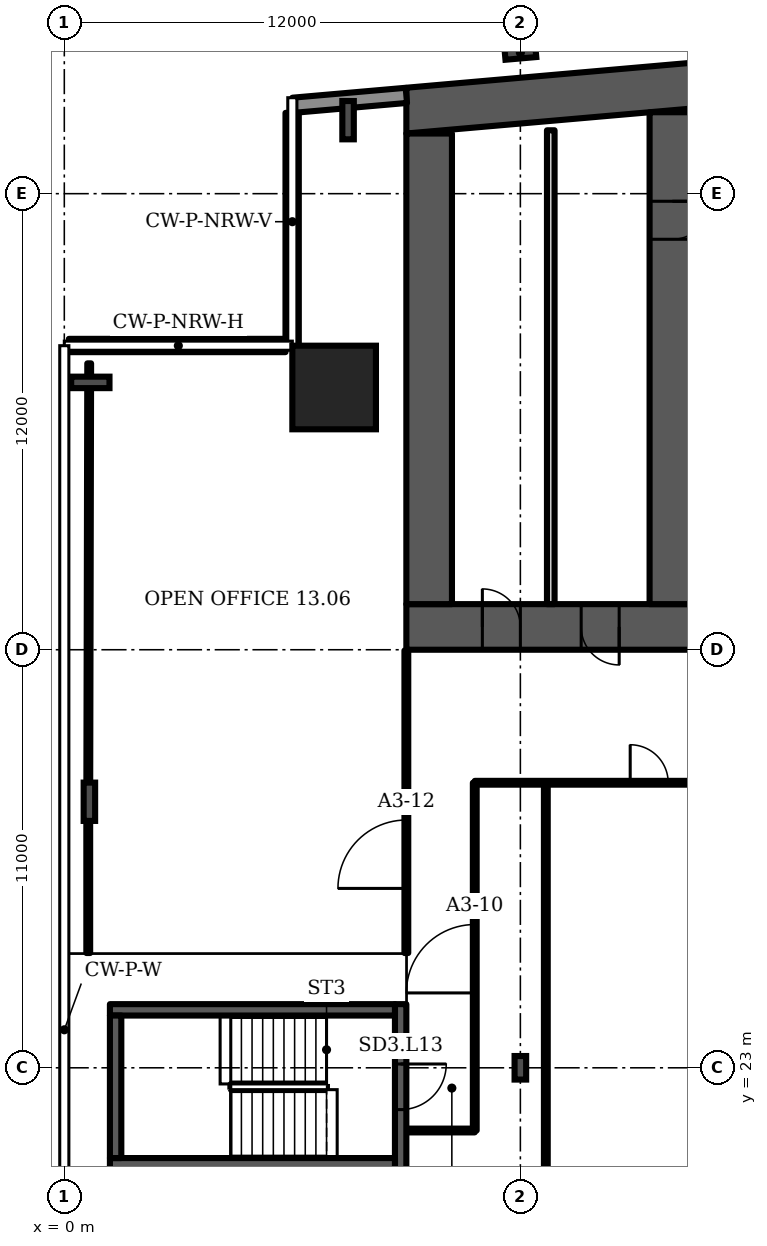
"""IFC4 building model, lengths in metres.
Left out: names, types, materials, properties, quantities, classifications, styles, units other than length and angle.
Written with IfcOpenShell. Run it as: python <this file> out.ifc"""

import sys

from ifc_helpers import new_model, si_unit, direction, frame, frame_2d, origin, origin_2d, place, context, subcontext, project, spatial, polyline, rectangle, i_section, outline, extrude, element, fill, save


model = new_model("IFC4")
c1 = context("Model", 3, precision=1e-05, world=origin(), true_north=direction((0.0, 1.0)))
c2 = subcontext(c1, "Body", "Model", "MODEL_VIEW")
j1 = project(units=[si_unit("LENGTHUNIT", "METRE"), si_unit("PLANEANGLEUNIT", "RADIAN")], contexts=[c1])
p1 = place(None, origin())
s1 = spatial("IfcSite", under=j1, at=p1, CompositionType="ELEMENT")
p2 = place(p1, origin())
s2 = spatial("IfcBuilding", under=s1, at=p2, CompositionType="ELEMENT")
p3 = place(p2, frame((0.0, 0.0, 66.7)))
s3 = spatial("IfcBuildingStorey", under=s2, at=p3, CompositionType="ELEMENT", Elevation=66.7)
p4 = place(p3, origin())
e1 = element("IfcWall", 1, at=p4, inside=s3, PredefinedType="SHEAR", context=c2, shape_type="SweptSolid", body=[
    extrude(outline(polyline([(9.0, 47.583), (37.0, 50.032), (65.0, 47.583), (65.0, 48.787), (37.0, 51.237), (9.0, 48.787), (9.0, 47.583)])), origin(), (0.0, 0.0, 1.0), 3.6),
])
p5 = place(p3, frame((9.0, 34.6, 0.0), z_axis=(0.0, 0.0, 1.0), x_axis=(1.0, 0.0, 0.0)))
e2 = element("IfcWall", 2, at=p5, inside=s3, PredefinedType="SHEAR", context=c2, shape_type="SweptSolid", body=[
    extrude(rectangle(XDim=56.0, YDim=1.2, at=frame_2d((28.0, 0.0))), origin(), (0.0, 0.0, 1.0), 3.6),
])
p6 = place(p5, frame((2.0, 0.0, 0.0)))
e3 = element("IfcOpeningElement", 3, at=p6, cuts=e2, PredefinedType="OPENING", context=c2, shape_type="SweptSolid", body=[
    extrude(rectangle(XDim=1.0, YDim=2.1, at=frame_2d((0.5, 1.05))), frame((0.0, 0.61, 0.0), z_axis=(0.0, -1.0, 0.0), x_axis=(1.0, 0.0, 0.0)), (0.0, 0.0, 1.0), 1.22),
])
p7 = place(p5, frame((4.6, 0.0, 0.0)))
e4 = element("IfcOpeningElement", 4, at=p7, cuts=e2, PredefinedType="OPENING", context=c2, shape_type="SweptSolid", body=[
    extrude(rectangle(XDim=1.0, YDim=2.1, at=frame_2d((0.5, 1.05))), frame((0.0, 0.61, 0.0), z_axis=(0.0, -1.0, 0.0), x_axis=(1.0, 0.0, 0.0)), (0.0, 0.0, 1.0), 1.22),
])
p8 = place(p5, frame((7.867, 0.0, 0.0)))
e5 = element("IfcOpeningElement", 5, at=p8, cuts=e2, PredefinedType="OPENING", context=c2, shape_type="SweptSolid", body=[
    extrude(rectangle(XDim=1.1, YDim=2.1, at=frame_2d((0.55, 1.05))), frame((0.0, 0.61, 0.0), z_axis=(0.0, -1.0, 0.0), x_axis=(1.0, 0.0, 0.0)), (0.0, 0.0, 1.0), 1.22),
])
p9 = place(p5, frame((12.033, 0.0, 0.0)))
e6 = element("IfcOpeningElement", 6, at=p9, cuts=e2, PredefinedType="OPENING", context=c2, shape_type="SweptSolid", body=[
    extrude(rectangle(XDim=1.1, YDim=2.1, at=frame_2d((0.55, 1.05))), frame((0.0, 0.61, 0.0), z_axis=(0.0, -1.0, 0.0), x_axis=(1.0, 0.0, 0.0)), (0.0, 0.0, 1.0), 1.22),
])
p10 = place(p5, frame((9.8, 0.0, 0.0)))
e7 = element("IfcOpeningElement", 7, at=p10, cuts=e2, PredefinedType="OPENING", context=c2, shape_type="SweptSolid", body=[
    extrude(rectangle(XDim=1.4, YDim=2.1, at=frame_2d((0.7, 1.05))), frame((0.0, 0.61, 0.0), z_axis=(0.0, -1.0, 0.0), x_axis=(1.0, 0.0, 0.0)), (0.0, 0.0, 1.0), 1.22),
])
p11 = place(p5, frame((14.65, 0.0, 0.0)))
e8 = element("IfcOpeningElement", 8, at=p11, cuts=e2, PredefinedType="OPENING", context=c2, shape_type="SweptSolid", body=[
    extrude(rectangle(XDim=1.2, YDim=2.1, at=frame_2d((0.6, 1.05))), frame((0.0, 0.61, 0.0), z_axis=(0.0, -1.0, 0.0), x_axis=(1.0, 0.0, 0.0)), (0.0, 0.0, 1.0), 1.22),
])
p12 = place(p5, frame((21.867, 0.0, 0.0)))
e9 = element("IfcOpeningElement", 9, at=p12, cuts=e2, PredefinedType="OPENING", context=c2, shape_type="SweptSolid", body=[
    extrude(rectangle(XDim=1.1, YDim=2.1, at=frame_2d((0.55, 1.05))), frame((0.0, 0.61, 0.0), z_axis=(0.0, -1.0, 0.0), x_axis=(1.0, 0.0, 0.0)), (0.0, 0.0, 1.0), 1.22),
])
p13 = place(p5, frame((26.033, 0.0, 0.0)))
e10 = element("IfcOpeningElement", 10, at=p13, cuts=e2, PredefinedType="OPENING", context=c2, shape_type="SweptSolid", body=[
    extrude(rectangle(XDim=1.1, YDim=2.1, at=frame_2d((0.55, 1.05))), frame((0.0, 0.61, 0.0), z_axis=(0.0, -1.0, 0.0), x_axis=(1.0, 0.0, 0.0)), (0.0, 0.0, 1.0), 1.22),
])
p14 = place(p5, frame((23.8, 0.0, 0.0)))
e11 = element("IfcOpeningElement", 11, at=p14, cuts=e2, PredefinedType="OPENING", context=c2, shape_type="SweptSolid", body=[
    extrude(rectangle(XDim=1.4, YDim=2.1, at=frame_2d((0.7, 1.05))), frame((0.0, 0.61, 0.0), z_axis=(0.0, -1.0, 0.0), x_axis=(1.0, 0.0, 0.0)), (0.0, 0.0, 1.0), 1.22),
])
p15 = place(p5, frame((28.867, 0.0, 0.0)))
e12 = element("IfcOpeningElement", 12, at=p15, cuts=e2, PredefinedType="OPENING", context=c2, shape_type="SweptSolid", body=[
    extrude(rectangle(XDim=1.1, YDim=2.1, at=frame_2d((0.55, 1.05))), frame((0.0, 0.61, 0.0), z_axis=(0.0, -1.0, 0.0), x_axis=(1.0, 0.0, 0.0)), (0.0, 0.0, 1.0), 1.22),
])
p16 = place(p5, frame((33.033, 0.0, 0.0)))
e13 = element("IfcOpeningElement", 13, at=p16, cuts=e2, PredefinedType="OPENING", context=c2, shape_type="SweptSolid", body=[
    extrude(rectangle(XDim=1.1, YDim=2.1, at=frame_2d((0.55, 1.05))), frame((0.0, 0.61, 0.0), z_axis=(0.0, -1.0, 0.0), x_axis=(1.0, 0.0, 0.0)), (0.0, 0.0, 1.0), 1.22),
])
p17 = place(p5, frame((40.15, 0.0, 0.0)))
e14 = element("IfcOpeningElement", 14, at=p17, cuts=e2, PredefinedType="OPENING", context=c2, shape_type="SweptSolid", body=[
    extrude(rectangle(XDim=1.2, YDim=2.1, at=frame_2d((0.6, 1.05))), frame((0.0, 0.61, 0.0), z_axis=(0.0, -1.0, 0.0), x_axis=(1.0, 0.0, 0.0)), (0.0, 0.0, 1.0), 1.22),
])
p18 = place(p5, frame((44.8, 0.0, 0.0)))
e15 = element("IfcOpeningElement", 15, at=p18, cuts=e2, PredefinedType="OPENING", context=c2, shape_type="SweptSolid", body=[
    extrude(rectangle(XDim=1.4, YDim=2.1, at=frame_2d((0.7, 1.05))), frame((0.0, 0.61, 0.0), z_axis=(0.0, -1.0, 0.0), x_axis=(1.0, 0.0, 0.0)), (0.0, 0.0, 1.0), 1.22),
])
p19 = place(p5, frame((49.867, 0.0, 0.0)))
e16 = element("IfcOpeningElement", 16, at=p19, cuts=e2, PredefinedType="OPENING", context=c2, shape_type="SweptSolid", body=[
    extrude(rectangle(XDim=1.1, YDim=2.1, at=frame_2d((0.55, 1.05))), frame((0.0, 0.61, 0.0), z_axis=(0.0, -1.0, 0.0), x_axis=(1.0, 0.0, 0.0)), (0.0, 0.0, 1.0), 1.22),
])
p20 = place(p5, frame((53.5, 0.0, 0.0)))
e17 = element("IfcOpeningElement", 17, at=p20, cuts=e2, PredefinedType="OPENING", context=c2, shape_type="SweptSolid", body=[
    extrude(rectangle(XDim=1.1, YDim=2.1, at=frame_2d((0.55, 1.05))), frame((0.0, 0.61, 0.0), z_axis=(0.0, -1.0, 0.0), x_axis=(1.0, 0.0, 0.0)), (0.0, 0.0, 1.0), 1.22),
])
p21 = place(p5, frame((51.567, 0.0, 0.0)))
e18 = element("IfcOpeningElement", 18, at=p21, cuts=e2, PredefinedType="OPENING", context=c2, shape_type="SweptSolid", body=[
    extrude(rectangle(XDim=1.4, YDim=2.1, at=frame_2d((0.7, 1.05))), frame((0.0, 0.61, 0.0), z_axis=(0.0, -1.0, 0.0), x_axis=(1.0, 0.0, 0.0)), (0.0, 0.0, 1.0), 1.22),
])
p22 = place(p3, frame((9.6, 35.2, 0.0), z_axis=(0.0, 0.0, 1.0), x_axis=(0.0, 1.0, 0.0)))
e19 = element("IfcWall", 19, at=p22, inside=s3, PredefinedType="SHEAR", context=c2, shape_type="SweptSolid", body=[
    extrude(rectangle(XDim=12.383, YDim=1.2, at=frame_2d((6.191, 0.0))), origin(), (0.0, 0.0, 1.0), 3.6),
])
p23 = place(p3, frame((16.0, 35.2, 0.0), z_axis=(0.0, 0.0, 1.0), x_axis=(0.0, 1.0, 0.0)))
e20 = element("IfcWall", 20, at=p23, inside=s3, PredefinedType="SHEAR", context=c2, shape_type="SweptSolid", body=[
    extrude(rectangle(XDim=12.943, YDim=1.2, at=frame_2d((6.471, 0.0))), origin(), (0.0, 0.0, 1.0), 3.6),
])
p24 = place(p23, frame((9.6, 0.0, 0.0)))
e21 = element("IfcOpeningElement", 21, at=p24, cuts=e20, PredefinedType="OPENING", context=c2, shape_type="SweptSolid", body=[
    extrude(rectangle(XDim=1.0, YDim=2.1, at=frame_2d((0.5, 1.05))), frame((0.0, 0.61, 0.0), z_axis=(0.0, -1.0, 0.0), x_axis=(1.0, 0.0, 0.0)), (0.0, 0.0, 1.0), 1.22),
])
p25 = place(p3, frame((7.1, 40.9, 0.0), z_axis=(0.0, 0.0, 1.0), x_axis=(1.0, 0.0, 0.0)))
e22 = element("IfcColumn", 22, at=p25, inside=s3, PredefinedType="COLUMN", context=c2, shape_type="SweptSolid", body=[
    extrude(rectangle(XDim=2.2, YDim=2.2, at=origin_2d()), origin(), (0.0, 0.0, 1.0), 3.6),
])
for number, where, z_axis, x_axis in (
    (23, (7.467, 47.934, 0.0), (0.0, 0.0, 1.0), (-1.0, 0.0, 0.0)),
    (24, (0.685, 41.034, 0.0), (0.0, 0.0, 1.0), (0.0, 1.0, 0.0)),
    (25, (0.66, 30.0, 0.0), (0.0, 0.0, 1.0), (-1.0, 0.0, 0.0)),
):
    element("IfcColumn", number, at=place(p3, frame(where, z_axis=z_axis, x_axis=x_axis)), inside=s3, PredefinedType="COLUMN", context=c2, shape_type="SweptSolid", body=[
        extrude(i_section(OverallWidth=0.302, OverallDepth=1.008, WebThickness=0.021, FlangeThickness=0.04, FilletRadius=0.03, at=origin_2d()), origin(), (0.0, 0.0, 1.0), 3.6),
    ])
p26 = place(p3, frame((12.0, 23.0, 0.0), z_axis=(0.0, 0.0, 1.0), x_axis=(1.0, 0.0, 0.0)))
e26 = element("IfcColumn", 26, at=p26, inside=s3, PredefinedType="COLUMN", context=c2, shape_type="SweptSolid", body=[
    extrude(i_section(OverallWidth=0.305, OverallDepth=0.62, WebThickness=0.021, FlangeThickness=0.04, FilletRadius=0.027, at=origin_2d()), origin(), (0.0, 0.0, 1.0), 3.6),
])
p27 = place(p3, frame((12.0, 49.71, 0.0), z_axis=(0.0, 0.0, 1.0), x_axis=(-0.087156, 0.996197, 0.0)))
e27 = element("IfcColumn", 27, at=p27, inside=s3, PredefinedType="COLUMN", context=c2, shape_type="SweptSolid", body=[
    extrude(i_section(OverallWidth=0.303, OverallDepth=0.814, WebThickness=0.021, FlangeThickness=0.04, FilletRadius=0.03, at=origin_2d()), origin(), (0.0, 0.0, 1.0), 3.6),
])
p28 = place(p3, frame((9.0, 48.587, 0.0), z_axis=(0.0, 0.0, 1.0), x_axis=(-0.996194, -0.087168, 0.0)))
e28 = element("IfcWall", 28, at=p28, inside=s3, PredefinedType="SOLIDWALL", context=c2, shape_type="SweptSolid", body=[
    extrude(rectangle(XDim=2.994, YDim=0.4, at=frame_2d((1.497, 0.0))), origin(), (0.0, 0.0, 1.0), 3.2),
])
p29 = place(p3, frame((5.995, 48.126, 0.0), z_axis=(0.0, 0.0, 1.0), x_axis=(0.0, -1.0, 0.0)))
e29 = element("IfcWall", 29, at=p29, inside=s3, PredefinedType="SOLIDWALL", context=c2, shape_type="SweptSolid", body=[
    extrude(rectangle(XDim=6.126, YDim=0.35, at=frame_2d((3.063, 0.0))), origin(), (0.0, 0.0, 1.0), 1.0),
])
p30 = place(p3, frame((5.82, 42.005, 0.0), z_axis=(0.0, 0.0, 1.0), x_axis=(-1.0, 0.0, 0.0)))
e30 = element("IfcWall", 30, at=p30, inside=s3, PredefinedType="SOLIDWALL", context=c2, shape_type="SweptSolid", body=[
    extrude(rectangle(XDim=5.7, YDim=0.35, at=frame_2d((2.85, 0.0))), origin(), (0.0, 0.0, 1.0), 1.0),
])
p31 = place(p3, frame((12.8, 35.2, 0.0), z_axis=(0.0, 0.0, 1.0), x_axis=(0.0, 1.0, 0.0)))
e31 = element("IfcWall", 31, at=p31, inside=s3, PredefinedType="PARTITIONING", context=c2, shape_type="SweptSolid", body=[
    extrude(rectangle(XDim=12.468, YDim=0.2, at=frame_2d((6.234, 0.0))), origin(), (0.0, 0.0, 1.0), 3.2),
])
p32 = place(p3, frame((8.85, 20.325, 0.0), z_axis=(0.0, 0.0, 1.0), x_axis=(0.0, 1.0, 0.0)))
e32 = element("IfcWall", 32, at=p32, inside=s3, PredefinedType="SHEAR", context=c2, shape_type="SweptSolid", body=[
    extrude(rectangle(XDim=4.35, YDim=0.3, at=frame_2d((2.175, 0.0))), origin(), (0.0, 0.0, 1.0), 3.2),
])
p33 = place(p32, frame((1.575, 0.0, 0.0)))
e33 = element("IfcOpeningElement", 33, at=p33, cuts=e32, PredefinedType="OPENING", context=c2, shape_type="SweptSolid", body=[
    extrude(rectangle(XDim=1.2, YDim=2.1, at=frame_2d((0.6, 1.05))), frame((0.0, 0.16, 0.0), z_axis=(0.0, -1.0, 0.0), x_axis=(1.0, 0.0, 0.0)), (0.0, 0.0, 1.0), 0.32),
])
p34 = place(p3, frame((0.63, 26.02, 0.0), z_axis=(0.0, 0.0, 1.0), x_axis=(0.0, 1.0, 0.0)))
e34 = element("IfcWall", 34, at=p34, inside=s3, PredefinedType="PARTITIONING", context=c2, shape_type="SweptSolid", body=[
    extrude(rectangle(XDim=3.98, YDim=0.1, at=frame_2d((1.99, 0.0))), origin(), (0.0, 0.0, 1.0), 2.58),
])
p35 = place(p3, frame((0.63, 30.0, 0.0), z_axis=(0.0, 0.0, 1.0), x_axis=(0.00218, 0.999994, 0.0)))
e35 = element("IfcWall", 35, at=p35, inside=s3, PredefinedType="PARTITIONING", context=c2, shape_type="SweptSolid", body=[
    extrude(rectangle(XDim=11.535, YDim=0.1, at=frame_2d((5.768, 0.0))), origin(), (0.0, 0.0, 1.0), 2.58),
])
p36 = place(p3, frame((9.0, 26.02, 0.0), z_axis=(0.0, 0.0, 1.0), x_axis=(0.0, 1.0, 0.0)))
e36 = element("IfcWall", 36, at=p36, inside=s3, PredefinedType="PARTITIONING", context=c2, shape_type="SweptSolid", body=[
    extrude(rectangle(XDim=7.96, YDim=0.1, at=frame_2d((3.98, 0.0))), origin(), (0.0, 0.0, 1.0), 3.2),
])
p37 = place(p36, frame((1.7, 0.0, 0.0)))
e37 = element("IfcOpeningElement", 37, at=p37, cuts=e36, PredefinedType="OPENING", context=c2, shape_type="SweptSolid", body=[
    extrude(rectangle(XDim=1.8, YDim=2.1, at=frame_2d((0.9, 1.05))), frame((0.0, 0.06, 0.0), z_axis=(0.0, -1.0, 0.0), x_axis=(1.0, 0.0, 0.0)), (0.0, 0.0, 1.0), 0.12),
])
p38 = place(p3, frame((9.02, 21.35, 0.0), z_axis=(0.0, 0.0, 1.0), x_axis=(1.0, 0.0, 0.0)))
e38 = element("IfcWall", 38, at=p38, inside=s3, PredefinedType="PARTITIONING", context=c2, shape_type="SweptSolid", body=[
    extrude(rectangle(XDim=1.78, YDim=0.1, at=frame_2d((0.89, 0.0))), origin(), (0.0, 0.0, 1.0), 3.2),
])
p39 = place(p3, frame((10.8, 21.35, 0.0), z_axis=(0.0, 0.0, 1.0), x_axis=(0.0, 1.0, 0.0)))
e39 = element("IfcWall", 39, at=p39, inside=s3, PredefinedType="PARTITIONING", context=c2, shape_type="SweptSolid", body=[
    extrude(rectangle(XDim=9.15, YDim=0.1, at=frame_2d((4.575, 0.0))), origin(), (0.0, 0.0, 1.0), 3.2),
])
p40 = place(p39, frame((3.62, 0.0, 0.0)))
e40 = element("IfcOpeningElement", 40, at=p40, cuts=e39, PredefinedType="OPENING", context=c2, shape_type="SweptSolid", body=[
    extrude(rectangle(XDim=1.8, YDim=2.1, at=frame_2d((0.9, 1.05))), frame((0.0, 0.06, 0.0), z_axis=(0.0, -1.0, 0.0), x_axis=(1.0, 0.0, 0.0)), (0.0, 0.0, 1.0), 0.12),
])
p41 = place(p3, frame((10.8, 30.5, 0.0), z_axis=(0.0, 0.0, 1.0), x_axis=(1.0, 0.0, 0.0)))
e41 = element("IfcWall", 41, at=p41, inside=s3, PredefinedType="PARTITIONING", context=c2, shape_type="SweptSolid", body=[
    extrude(rectangle(XDim=26.05, YDim=0.1, at=frame_2d((13.025, 0.0))), origin(), (0.0, 0.0, 1.0), 3.2),
])
p42 = place(p41, frame((4.09, 0.0, 0.0)))
e42 = element("IfcOpeningElement", 42, at=p42, cuts=e41, PredefinedType="OPENING", context=c2, shape_type="SweptSolid", body=[
    extrude(rectangle(XDim=1.0, YDim=2.1, at=frame_2d((0.5, 1.05))), frame((0.0, 0.06, 0.0), z_axis=(0.0, -1.0, 0.0), x_axis=(1.0, 0.0, 0.0)), (0.0, 0.0, 1.0), 0.12),
])
p43 = place(p41, frame((9.5, 0.0, 0.0)))
e43 = element("IfcOpeningElement", 43, at=p43, cuts=e41, PredefinedType="OPENING", context=c2, shape_type="SweptSolid", body=[
    extrude(rectangle(XDim=1.0, YDim=2.1, at=frame_2d((0.5, 1.05))), frame((0.0, 0.06, 0.0), z_axis=(0.0, -1.0, 0.0), x_axis=(1.0, 0.0, 0.0)), (0.0, 0.0, 1.0), 0.12),
])
p44 = place(p41, frame((14.755, 0.0, 0.0)))
e44 = element("IfcOpeningElement", 44, at=p44, cuts=e41, PredefinedType="OPENING", context=c2, shape_type="SweptSolid", body=[
    extrude(rectangle(XDim=1.0, YDim=2.1, at=frame_2d((0.5, 1.05))), frame((0.0, 0.06, 0.0), z_axis=(0.0, -1.0, 0.0), x_axis=(1.0, 0.0, 0.0)), (0.0, 0.0, 1.0), 0.12),
])
p45 = place(p41, frame((21.49, 0.0, 0.0)))
e45 = element("IfcOpeningElement", 45, at=p45, cuts=e41, PredefinedType="OPENING", context=c2, shape_type="SweptSolid", body=[
    extrude(rectangle(XDim=1.0, YDim=2.1, at=frame_2d((0.5, 1.05))), frame((0.0, 0.06, 0.0), z_axis=(0.0, -1.0, 0.0), x_axis=(1.0, 0.0, 0.0)), (0.0, 0.0, 1.0), 0.12),
])
p46 = place(p3, frame((12.67, -1.088, 0.0), z_axis=(0.0, 0.0, 1.0), x_axis=(0.0, 1.0, 0.0)))
e46 = element("IfcWall", 46, at=p46, inside=s3, PredefinedType="PARTITIONING", context=c2, shape_type="SweptSolid", body=[
    extrude(rectangle(XDim=31.588, YDim=0.1, at=frame_2d((15.794, 0.0))), origin(), (0.0, 0.0, 1.0), 3.2),
])
for number, where, z_axis, x_axis in (
    (47, (1.2, 20.475, 0.0), (0.0, 0.0, 1.0), (1.0, 0.0, 0.0)),
    (48, (1.2, 24.525, 0.0), (0.0, 0.0, 1.0), (1.0, 0.0, 0.0)),
):
    element("IfcWall", number, at=place(p3, frame(where, z_axis=z_axis, x_axis=x_axis)), inside=s3, PredefinedType="SHEAR", context=c2, shape_type="SweptSolid", body=[
        extrude(rectangle(XDim=7.5, YDim=0.3, at=frame_2d((3.75, 0.0))), origin(), (0.0, 0.0, 1.0), 3.2),
    ])
p47 = place(p3, frame((1.35, 20.625, 0.0), z_axis=(0.0, 0.0, 1.0), x_axis=(0.0, 1.0, 0.0)))
e49 = element("IfcWall", 49, at=p47, inside=s3, PredefinedType="SHEAR", context=c2, shape_type="SweptSolid", body=[
    extrude(rectangle(XDim=3.75, YDim=0.3, at=frame_2d((1.875, 0.0))), origin(), (0.0, 0.0, 1.0), 3.2),
])
p48 = place(p6, origin())
e50 = element("IfcDoor", 50, at=p48, inside=s3, OperationType="SINGLE_SWING_LEFT", PredefinedType="DOOR", context=c2, shape_type="SweptSolid", body=[
    extrude(rectangle(XDim=1.0, YDim=2.1, at=frame_2d((0.5, 1.05))), frame((0.0, 0.6, 0.0), z_axis=(0.0, -1.0, 0.0), x_axis=(1.0, 0.0, 0.0)), (0.0, 0.0, 1.0), 1.199),
])
fill(e3, e50)
p49 = place(p7, origin())
e51 = element("IfcDoor", 51, at=p49, inside=s3, OperationType="SINGLE_SWING_RIGHT", PredefinedType="DOOR", context=c2, shape_type="SweptSolid", body=[
    extrude(rectangle(XDim=1.0, YDim=2.1, at=frame_2d((0.5, 1.05))), frame((0.0, 0.6, 0.0), z_axis=(0.0, -1.0, 0.0), x_axis=(1.0, 0.0, 0.0)), (0.0, 0.0, 1.0), 1.199),
])
fill(e4, e51)
p50 = place(p24, origin())
e52 = element("IfcDoor", 52, at=p50, inside=s3, OperationType="SINGLE_SWING_RIGHT", PredefinedType="DOOR", context=c2, shape_type="SweptSolid", body=[
    extrude(rectangle(XDim=1.0, YDim=2.1, at=frame_2d((0.5, 1.05))), frame((0.0, 0.6, 0.0), z_axis=(0.0, -1.0, 0.0), x_axis=(1.0, 0.0, 0.0)), (0.0, 0.0, 1.0), 1.199),
])
fill(e21, e52)
p51 = place(p33, origin())
e53 = element("IfcDoor", 53, at=p51, inside=s3, OperationType="SINGLE_SWING_RIGHT", PredefinedType="DOOR", context=c2, shape_type="SweptSolid", body=[
    extrude(rectangle(XDim=1.2, YDim=2.1, at=frame_2d((0.6, 1.05))), frame((0.0, 0.025, 0.0), z_axis=(0.0, -1.0, 0.0), x_axis=(1.0, 0.0, 0.0)), (0.0, 0.0, 1.0), 0.05),
])
fill(e33, e53)
p52 = place(p40, origin())
e54 = element("IfcDoor", 54, at=p52, inside=s3, OperationType="DOUBLE_DOOR_SINGLE_SWING", PredefinedType="DOOR", context=c2, shape_type="SweptSolid", body=[
    extrude(rectangle(XDim=1.8, YDim=2.1, at=frame_2d((0.9, 1.05))), frame((0.0, 0.025, 0.0), z_axis=(0.0, -1.0, 0.0), x_axis=(1.0, 0.0, 0.0)), (0.0, 0.0, 1.0), 0.05),
])
fill(e40, e54)
p53 = place(p37, origin())
e55 = element("IfcDoor", 55, at=p53, inside=s3, OperationType="DOUBLE_DOOR_SINGLE_SWING", PredefinedType="DOOR", context=c2, shape_type="SweptSolid", body=[
    extrude(rectangle(XDim=1.8, YDim=2.1, at=frame_2d((0.9, 1.05))), frame((0.0, 0.025, 0.0), z_axis=(0.0, -1.0, 0.0), x_axis=(1.0, 0.0, 0.0)), (0.0, 0.0, 1.0), 0.05),
])
fill(e37, e55)
p54 = place(p42, origin())
e56 = element("IfcDoor", 56, at=p54, inside=s3, OperationType="SINGLE_SWING_LEFT", PredefinedType="DOOR", context=c2, shape_type="SweptSolid", body=[
    extrude(rectangle(XDim=1.0, YDim=2.1, at=frame_2d((0.5, 1.05))), frame((0.0, 0.025, 0.0), z_axis=(0.0, -1.0, 0.0), x_axis=(1.0, 0.0, 0.0)), (0.0, 0.0, 1.0), 0.05),
])
fill(e42, e56)
save(model, sys.argv[1])
